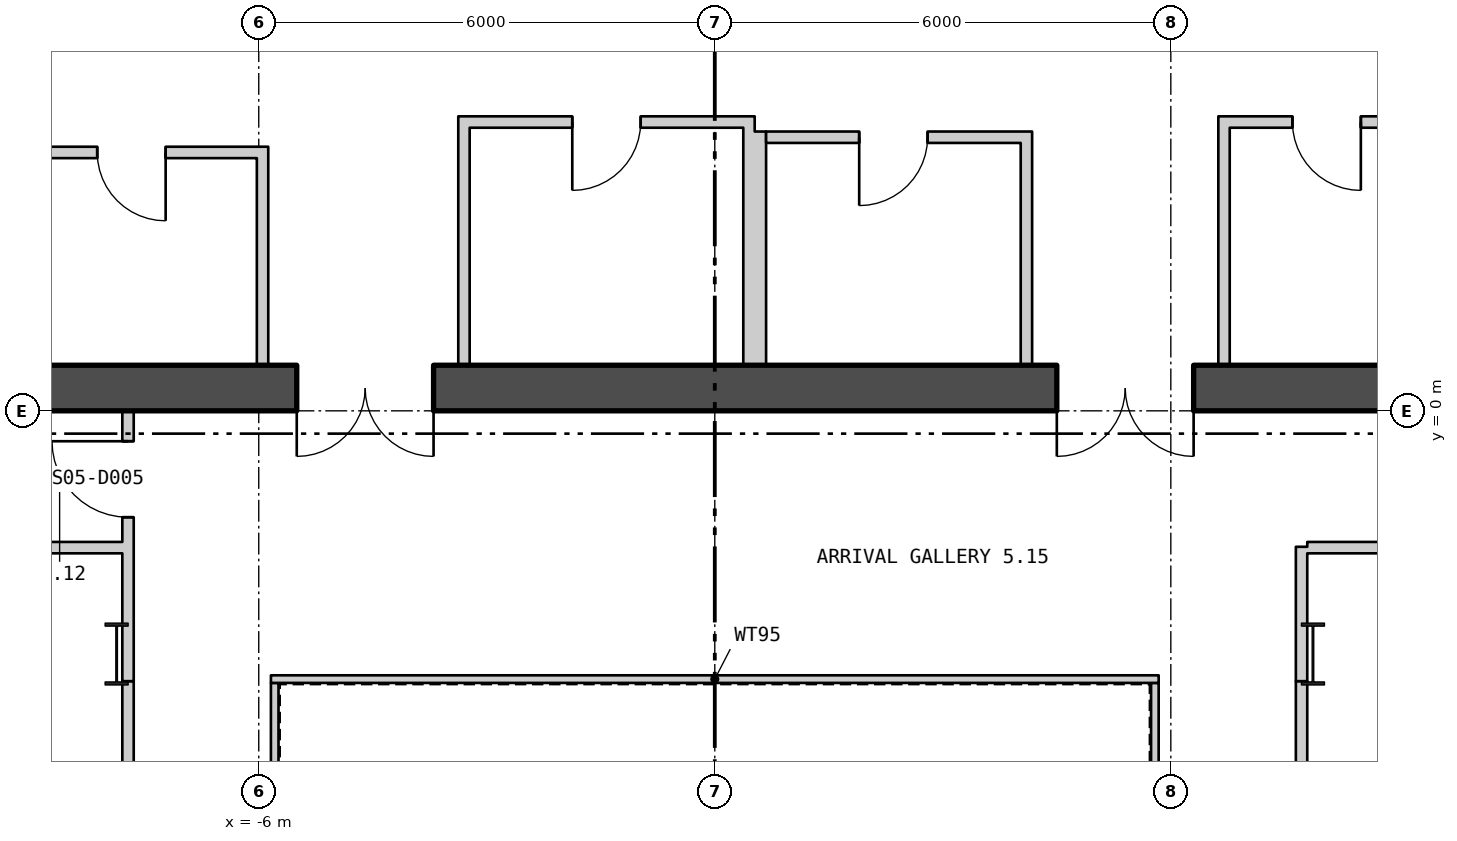
"""IFC4 building model, lengths in metres.
Left out: names, types, materials, properties, quantities, classifications, styles, units other than length and angle.
Written with IfcOpenShell. Run it as: python <this file> out.ifc"""

import sys

from ifc_helpers import new_model, si_unit, direction, frame, frame_2d, origin, origin_2d, place, context, subcontext, project, spatial, polyline, rectangle, i_section, outline, extrude, element, fill, save


model = new_model("IFC4")
c1 = context("Model", 3, precision=1e-05, world=origin(), true_north=direction((0.0, 1.0)))
c2 = subcontext(c1, "Body", "Model", "MODEL_VIEW")
j1 = project(units=[si_unit("LENGTHUNIT", "METRE"), si_unit("PLANEANGLEUNIT", "RADIAN")], contexts=[c1])
p1 = place(None, origin())
s1 = spatial("IfcSite", under=j1, at=p1, CompositionType="ELEMENT")
p2 = place(p1, origin())
s2 = spatial("IfcBuilding", under=s1, at=p2, CompositionType="ELEMENT")
p3 = place(p2, frame((0.0, 0.0, 69.3)))
s3 = spatial("IfcBuildingStorey", under=s2, at=p3, CompositionType="ELEMENT", Elevation=69.3)
for number, where, z_axis, x_axis in (
    (1, (7.87, -3.2, 0.0), (0.0, 0.0, 1.0), (1.0, 0.0, 0.0)),
    (2, (-7.87, -3.2, 0.0), (0.0, 0.0, 1.0), (1.0, 0.0, 0.0)),
):
    element("IfcColumn", number, at=place(p3, frame(where, z_axis=z_axis, x_axis=x_axis)), inside=s3, PredefinedType="COLUMN", context=c2, shape_type="SweptSolid", body=[
        extrude(i_section(OverallWidth=0.303, OverallDepth=0.814, WebThickness=0.021, FlangeThickness=0.04, at=origin_2d()), origin(), (0.0, 0.0, 1.0), 4.5),
    ])
p4 = place(p3, frame((-28.18, 10.778, -0.18), z_axis=(0.0, 0.0, 1.0), x_axis=(0.500000711659, -0.866024992908, 0.0)))
e3 = element("IfcWall", 3, at=p4, inside=s3, PredefinedType="SOLIDWALL", context=c2, shape_type="SweptSolid", body=[
    extrude(outline(polyline([(-0.13, -0.225), (45.87, -0.225), (45.61, 0.225), (0.13, 0.225), (-0.13, -0.225)])), origin(), (0.0, 0.0, 1.0), 4.28),
])
p5 = place(p4, frame((1.424, 0.0, 1.08)))
e4 = element("IfcOpeningElement", 4, at=p5, cuts=e3, PredefinedType="OPENING", context=c2, shape_type="SweptSolid", body=[
    extrude(rectangle(XDim=2.4, YDim=2.6, at=frame_2d((1.2, 1.3))), frame((0.0, 0.235, 0.0), z_axis=(0.0, -1.0, 0.0), x_axis=(1.0, 0.0, 0.0)), (0.0, 0.0, 1.0), 0.47),
])
p6 = place(p4, frame((5.893, 0.0, 1.08)))
e5 = element("IfcOpeningElement", 5, at=p6, cuts=e3, PredefinedType="OPENING", context=c2, shape_type="SweptSolid", body=[
    extrude(rectangle(XDim=2.4, YDim=2.6, at=frame_2d((1.2, 1.3))), frame((0.0, 0.235, 0.0), z_axis=(0.0, -1.0, 0.0), x_axis=(1.0, 0.0, 0.0)), (0.0, 0.0, 1.0), 0.47),
])
p7 = place(p4, frame((10.401, 0.0, 1.08)))
e6 = element("IfcOpeningElement", 6, at=p7, cuts=e3, PredefinedType="OPENING", context=c2, shape_type="SweptSolid", body=[
    extrude(rectangle(XDim=2.4, YDim=2.6, at=frame_2d((1.2, 1.3))), frame((0.0, 0.235, 0.0), z_axis=(0.0, -1.0, 0.0), x_axis=(1.0, 0.0, 0.0)), (0.0, 0.0, 1.0), 0.47),
])
p8 = place(p4, frame((14.909, 0.0, 1.08)))
e7 = element("IfcOpeningElement", 7, at=p8, cuts=e3, PredefinedType="OPENING", context=c2, shape_type="SweptSolid", body=[
    extrude(rectangle(XDim=2.4, YDim=2.6, at=frame_2d((1.2, 1.3))), frame((0.0, 0.235, 0.0), z_axis=(0.0, -1.0, 0.0), x_axis=(1.0, 0.0, 0.0)), (0.0, 0.0, 1.0), 0.47),
])
p9 = place(p4, frame((19.416, 0.0, 1.08)))
e8 = element("IfcOpeningElement", 8, at=p9, cuts=e3, PredefinedType="OPENING", context=c2, shape_type="SweptSolid", body=[
    extrude(rectangle(XDim=2.4, YDim=2.6, at=frame_2d((1.2, 1.3))), frame((0.0, 0.235, 0.0), z_axis=(0.0, -1.0, 0.0), x_axis=(1.0, 0.0, 0.0)), (0.0, 0.0, 1.0), 0.47),
])
p10 = place(p4, frame((23.924, 0.0, 1.08)))
e9 = element("IfcOpeningElement", 9, at=p10, cuts=e3, PredefinedType="OPENING", context=c2, shape_type="SweptSolid", body=[
    extrude(rectangle(XDim=2.4, YDim=2.6, at=frame_2d((1.2, 1.3))), frame((0.0, 0.235, 0.0), z_axis=(0.0, -1.0, 0.0), x_axis=(1.0, 0.0, 0.0)), (0.0, 0.0, 1.0), 0.47),
])
p11 = place(p4, frame((28.431, 0.0, 1.08)))
e10 = element("IfcOpeningElement", 10, at=p11, cuts=e3, PredefinedType="OPENING", context=c2, shape_type="SweptSolid", body=[
    extrude(rectangle(XDim=2.4, YDim=2.6, at=frame_2d((1.2, 1.3))), frame((0.0, 0.235, 0.0), z_axis=(0.0, -1.0, 0.0), x_axis=(1.0, 0.0, 0.0)), (0.0, 0.0, 1.0), 0.47),
])
p12 = place(p4, frame((32.939, 0.0, 1.08)))
e11 = element("IfcOpeningElement", 11, at=p12, cuts=e3, PredefinedType="OPENING", context=c2, shape_type="SweptSolid", body=[
    extrude(rectangle(XDim=2.4, YDim=2.6, at=frame_2d((1.2, 1.3))), frame((0.0, 0.235, 0.0), z_axis=(0.0, -1.0, 0.0), x_axis=(1.0, 0.0, 0.0)), (0.0, 0.0, 1.0), 0.47),
])
p13 = place(p4, frame((37.447, 0.0, 1.08)))
e12 = element("IfcOpeningElement", 12, at=p13, cuts=e3, PredefinedType="OPENING", context=c2, shape_type="SweptSolid", body=[
    extrude(rectangle(XDim=2.4, YDim=2.6, at=frame_2d((1.2, 1.3))), frame((0.0, 0.235, 0.0), z_axis=(0.0, -1.0, 0.0), x_axis=(1.0, 0.0, 0.0)), (0.0, 0.0, 1.0), 0.47),
])
p14 = place(p4, frame((41.916, 0.0, 1.08)))
e13 = element("IfcOpeningElement", 13, at=p14, cuts=e3, PredefinedType="OPENING", context=c2, shape_type="SweptSolid", body=[
    extrude(rectangle(XDim=2.4, YDim=2.6, at=frame_2d((1.2, 1.3))), frame((0.0, 0.235, 0.0), z_axis=(0.0, -1.0, 0.0), x_axis=(1.0, 0.0, 0.0)), (0.0, 0.0, 1.0), 0.47),
])
p15 = place(p3, frame((5.31, -28.834, -0.18), z_axis=(0.0, 0.0, 1.0), x_axis=(0.500000711659, 0.866024992908, 0.0)))
e14 = element("IfcWall", 14, at=p15, inside=s3, PredefinedType="SOLIDWALL", context=c2, shape_type="SweptSolid", body=[
    extrude(outline(polyline([(-0.13, -0.225), (45.87, -0.225), (45.61, 0.225), (0.13, 0.225), (-0.13, -0.225)])), origin(), (0.0, 0.0, 1.0), 4.28),
])
p16 = place(p15, frame((1.424, 0.0, 1.08)))
e15 = element("IfcOpeningElement", 15, at=p16, cuts=e14, PredefinedType="OPENING", context=c2, shape_type="SweptSolid", body=[
    extrude(rectangle(XDim=2.4, YDim=2.6, at=frame_2d((1.2, 1.3))), frame((0.0, 0.235, 0.0), z_axis=(0.0, -1.0, 0.0), x_axis=(1.0, 0.0, 0.0)), (0.0, 0.0, 1.0), 0.47),
])
p17 = place(p15, frame((5.893, 0.0, 1.08)))
e16 = element("IfcOpeningElement", 16, at=p17, cuts=e14, PredefinedType="OPENING", context=c2, shape_type="SweptSolid", body=[
    extrude(rectangle(XDim=2.4, YDim=2.6, at=frame_2d((1.2, 1.3))), frame((0.0, 0.235, 0.0), z_axis=(0.0, -1.0, 0.0), x_axis=(1.0, 0.0, 0.0)), (0.0, 0.0, 1.0), 0.47),
])
p18 = place(p15, frame((10.401, 0.0, 1.08)))
e17 = element("IfcOpeningElement", 17, at=p18, cuts=e14, PredefinedType="OPENING", context=c2, shape_type="SweptSolid", body=[
    extrude(rectangle(XDim=2.4, YDim=2.6, at=frame_2d((1.2, 1.3))), frame((0.0, 0.235, 0.0), z_axis=(0.0, -1.0, 0.0), x_axis=(1.0, 0.0, 0.0)), (0.0, 0.0, 1.0), 0.47),
])
p19 = place(p15, frame((14.909, 0.0, 1.08)))
e18 = element("IfcOpeningElement", 18, at=p19, cuts=e14, PredefinedType="OPENING", context=c2, shape_type="SweptSolid", body=[
    extrude(rectangle(XDim=2.4, YDim=2.6, at=frame_2d((1.2, 1.3))), frame((0.0, 0.235, 0.0), z_axis=(0.0, -1.0, 0.0), x_axis=(1.0, 0.0, 0.0)), (0.0, 0.0, 1.0), 0.47),
])
p20 = place(p15, frame((19.416, 0.0, 1.08)))
e19 = element("IfcOpeningElement", 19, at=p20, cuts=e14, PredefinedType="OPENING", context=c2, shape_type="SweptSolid", body=[
    extrude(rectangle(XDim=2.4, YDim=2.6, at=frame_2d((1.2, 1.3))), frame((0.0, 0.235, 0.0), z_axis=(0.0, -1.0, 0.0), x_axis=(1.0, 0.0, 0.0)), (0.0, 0.0, 1.0), 0.47),
])
p21 = place(p15, frame((23.924, 0.0, 1.08)))
e20 = element("IfcOpeningElement", 20, at=p21, cuts=e14, PredefinedType="OPENING", context=c2, shape_type="SweptSolid", body=[
    extrude(rectangle(XDim=2.4, YDim=2.6, at=frame_2d((1.2, 1.3))), frame((0.0, 0.235, 0.0), z_axis=(0.0, -1.0, 0.0), x_axis=(1.0, 0.0, 0.0)), (0.0, 0.0, 1.0), 0.47),
])
p22 = place(p15, frame((28.431, 0.0, 1.08)))
e21 = element("IfcOpeningElement", 21, at=p22, cuts=e14, PredefinedType="OPENING", context=c2, shape_type="SweptSolid", body=[
    extrude(rectangle(XDim=2.4, YDim=2.6, at=frame_2d((1.2, 1.3))), frame((0.0, 0.235, 0.0), z_axis=(0.0, -1.0, 0.0), x_axis=(1.0, 0.0, 0.0)), (0.0, 0.0, 1.0), 0.47),
])
p23 = place(p15, frame((37.447, 0.0, 1.08)))
e22 = element("IfcOpeningElement", 22, at=p23, cuts=e14, PredefinedType="OPENING", context=c2, shape_type="SweptSolid", body=[
    extrude(rectangle(XDim=2.4, YDim=2.6, at=frame_2d((1.2, 1.3))), frame((0.0, 0.235, 0.0), z_axis=(0.0, -1.0, 0.0), x_axis=(1.0, 0.0, 0.0)), (0.0, 0.0, 1.0), 0.47),
])
p24 = place(p15, frame((41.916, 0.0, 1.08)))
e23 = element("IfcOpeningElement", 23, at=p24, cuts=e14, PredefinedType="OPENING", context=c2, shape_type="SweptSolid", body=[
    extrude(rectangle(XDim=2.4, YDim=2.6, at=frame_2d((1.2, 1.3))), frame((0.0, 0.235, 0.0), z_axis=(0.0, -1.0, 0.0), x_axis=(1.0, 0.0, 0.0)), (0.0, 0.0, 1.0), 0.47),
])
p25 = place(p3, frame((5.79, -11.62, 0.0), z_axis=(0.0, 0.0, 1.0), x_axis=(0.0, 1.0, 0.0)))
e24 = element("IfcWall", 24, at=p25, inside=s3, PredefinedType="PARTITIONING", context=c2, shape_type="SweptSolid", body=[
    extrude(rectangle(XDim=8.04, YDim=0.1, at=frame_2d((4.02, 0.0))), origin(), (0.0, 0.0, 1.0), 4.3),
])
p26 = place(p3, frame((5.84, -3.53, 0.0), z_axis=(0.0, 0.0, 1.0), x_axis=(-1.0, 0.0, 0.0)))
e25 = element("IfcWall", 25, at=p26, inside=s3, PredefinedType="PARTITIONING", context=c2, shape_type="SweptSolid", body=[
    extrude(rectangle(XDim=11.68, YDim=0.1, at=frame_2d((5.84, 0.0))), origin(), (0.0, 0.0, 1.0), 4.3),
])
p27 = place(p3, frame((-5.79, -3.58, 0.0), z_axis=(0.0, 0.0, 1.0), x_axis=(0.0, -1.0, 0.0)))
e26 = element("IfcWall", 26, at=p27, inside=s3, PredefinedType="PARTITIONING", context=c2, shape_type="SweptSolid", body=[
    extrude(rectangle(XDim=8.04, YDim=0.1, at=frame_2d((4.02, 0.0))), origin(), (0.0, 0.0, 1.0), 4.3),
])
p28 = place(p3, frame((-17.5, 0.3, 0.0), z_axis=(0.0, 0.0, 1.0), x_axis=(1.0, 0.0, 0.0)))
e27 = element("IfcWall", 27, at=p28, inside=s3, PredefinedType="SHEAR", context=c2, shape_type="SweptSolid", body=[
    extrude(rectangle(XDim=35.0, YDim=0.6, at=frame_2d((17.5, 0.0))), origin(), (0.0, 0.0, 1.0), 4.3),
])
p29 = place(p28, frame((12.0, 0.0, 0.0)))
e28 = element("IfcOpeningElement", 28, at=p29, cuts=e27, PredefinedType="OPENING", context=c2, shape_type="SweptSolid", body=[
    extrude(rectangle(XDim=1.8, YDim=2.4, at=frame_2d((0.9, 1.2))), frame((0.0, 0.31, 0.0), z_axis=(0.0, -1.0, 0.0), x_axis=(1.0, 0.0, 0.0)), (0.0, 0.0, 1.0), 0.62),
])
p30 = place(p28, frame((22.0, 0.0, 0.0)))
e29 = element("IfcOpeningElement", 29, at=p30, cuts=e27, PredefinedType="OPENING", context=c2, shape_type="SweptSolid", body=[
    extrude(rectangle(XDim=1.8, YDim=2.4, at=frame_2d((0.9, 1.2))), frame((0.0, 0.31, 0.0), z_axis=(0.0, -1.0, 0.0), x_axis=(1.0, 0.0, 0.0)), (0.0, 0.0, 1.0), 0.62),
])
p31 = place(p3, frame((-5.95, 0.6, 0.0), z_axis=(0.0, 0.0, 1.0), x_axis=(0.0, 1.0, 0.0)))
e30 = element("IfcWall", 30, at=p31, inside=s3, PredefinedType="PARTITIONING", context=c2, shape_type="SweptSolid", body=[
    extrude(rectangle(XDim=2.875, YDim=0.15, at=frame_2d((1.438, 0.0))), origin(), (0.0, 0.0, 1.0), 4.3),
])
p32 = place(p3, frame((-9.325, 3.4, 0.0), z_axis=(0.0, 0.0, 1.0), x_axis=(1.0, 0.0, 0.0)))
e31 = element("IfcWall", 31, at=p32, inside=s3, PredefinedType="PARTITIONING", context=c2, shape_type="SweptSolid", body=[
    extrude(rectangle(XDim=3.3, YDim=0.15, at=frame_2d((1.65, 0.0))), origin(), (0.0, 0.0, 1.0), 4.3),
])
p33 = place(p32, frame((1.2, 0.0, 0.0)))
e32 = element("IfcOpeningElement", 32, at=p33, cuts=e31, PredefinedType="OPENING", context=c2, shape_type="SweptSolid", body=[
    extrude(rectangle(XDim=0.9, YDim=2.1, at=frame_2d((0.45, 1.05))), frame((0.0, 0.085, 0.0), z_axis=(0.0, -1.0, 0.0), x_axis=(1.0, 0.0, 0.0)), (0.0, 0.0, 1.0), 0.17),
])
for number, where, z_axis, x_axis in (
    (33, (-3.3, 0.6, 0.0), (0.0, 0.0, 1.0), (0.0, 1.0, 0.0)),
    (34, (0.45, 0.6, 0.0), (0.0, 0.0, 1.0), (0.0, 1.0, 0.0)),
):
    element("IfcWall", number, at=place(p3, frame(where, z_axis=z_axis, x_axis=x_axis)), inside=s3, PredefinedType="PARTITIONING", context=c2, shape_type="SweptSolid", body=[
        extrude(rectangle(XDim=3.275, YDim=0.15, at=frame_2d((1.637, 0.0))), origin(), (0.0, 0.0, 1.0), 4.3),
    ])
p34 = place(p3, frame((-3.225, 3.8, 0.0), z_axis=(0.0, 0.0, 1.0), x_axis=(1.0, 0.0, 0.0)))
e35 = element("IfcWall", 35, at=p34, inside=s3, PredefinedType="PARTITIONING", context=c2, shape_type="SweptSolid", body=[
    extrude(rectangle(XDim=3.6, YDim=0.15, at=frame_2d((1.8, 0.0))), origin(), (0.0, 0.0, 1.0), 4.3),
])
p35 = place(p34, frame((1.35, 0.0, 0.0)))
e36 = element("IfcOpeningElement", 36, at=p35, cuts=e35, PredefinedType="OPENING", context=c2, shape_type="SweptSolid", body=[
    extrude(rectangle(XDim=0.9, YDim=2.1, at=frame_2d((0.45, 1.05))), frame((0.0, 0.085, 0.0), z_axis=(0.0, -1.0, 0.0), x_axis=(1.0, 0.0, 0.0)), (0.0, 0.0, 1.0), 0.17),
])
for number, where, z_axis, x_axis in (
    (37, (0.6, 0.6, 0.0), (0.0, 0.0, 1.0), (0.0, 1.0, 0.0)),
    (38, (4.1, 0.6, 0.0), (0.0, 0.0, 1.0), (0.0, 1.0, 0.0)),
):
    element("IfcWall", number, at=place(p3, frame(where, z_axis=z_axis, x_axis=x_axis)), inside=s3, PredefinedType="PARTITIONING", context=c2, shape_type="SweptSolid", body=[
        extrude(rectangle(XDim=3.075, YDim=0.15, at=frame_2d((1.538, 0.0))), origin(), (0.0, 0.0, 1.0), 4.3),
    ])
p36 = place(p3, frame((0.675, 3.6, 0.0), z_axis=(0.0, 0.0, 1.0), x_axis=(1.0, 0.0, 0.0)))
e39 = element("IfcWall", 39, at=p36, inside=s3, PredefinedType="PARTITIONING", context=c2, shape_type="SweptSolid", body=[
    extrude(rectangle(XDim=3.35, YDim=0.15, at=frame_2d((1.675, 0.0))), origin(), (0.0, 0.0, 1.0), 4.3),
])
p37 = place(p36, frame((1.225, 0.0, 0.0)))
e40 = element("IfcOpeningElement", 40, at=p37, cuts=e39, PredefinedType="OPENING", context=c2, shape_type="SweptSolid", body=[
    extrude(rectangle(XDim=0.9, YDim=2.1, at=frame_2d((0.45, 1.05))), frame((0.0, 0.085, 0.0), z_axis=(0.0, -1.0, 0.0), x_axis=(1.0, 0.0, 0.0)), (0.0, 0.0, 1.0), 0.17),
])
p38 = place(p3, frame((6.7, 0.6, 0.0), z_axis=(0.0, 0.0, 1.0), x_axis=(0.0, 1.0, 0.0)))
e41 = element("IfcWall", 41, at=p38, inside=s3, PredefinedType="PARTITIONING", context=c2, shape_type="SweptSolid", body=[
    extrude(rectangle(XDim=3.275, YDim=0.15, at=frame_2d((1.637, 0.0))), origin(), (0.0, 0.0, 1.0), 4.3),
])
p39 = place(p3, frame((6.775, 3.8, 0.0), z_axis=(0.0, 0.0, 1.0), x_axis=(1.0, 0.0, 0.0)))
e42 = element("IfcWall", 42, at=p39, inside=s3, PredefinedType="PARTITIONING", context=c2, shape_type="SweptSolid", body=[
    extrude(rectangle(XDim=2.55, YDim=0.15, at=frame_2d((1.275, 0.0))), origin(), (0.0, 0.0, 1.0), 4.3),
])
p40 = place(p39, frame((0.825, 0.0, 0.0)))
e43 = element("IfcOpeningElement", 43, at=p40, cuts=e42, PredefinedType="OPENING", context=c2, shape_type="SweptSolid", body=[
    extrude(rectangle(XDim=0.9, YDim=2.1, at=frame_2d((0.45, 1.05))), frame((0.0, 0.085, 0.0), z_axis=(0.0, -1.0, 0.0), x_axis=(1.0, 0.0, 0.0)), (0.0, 0.0, 1.0), 0.17),
])
p41 = place(p3, frame((-19.225, -1.8, 0.0), z_axis=(0.0, 0.0, 1.0), x_axis=(1.0, 0.0, 0.0)))
e44 = element("IfcWall", 44, at=p41, inside=s3, PredefinedType="PARTITIONING", context=c2, shape_type="SweptSolid", body=[
    extrude(rectangle(XDim=11.43, YDim=0.15, at=frame_2d((5.715, 0.0))), origin(), (0.0, 0.0, 1.0), 4.3),
])
p42 = place(p3, frame((-7.72, -13.675, 0.0), z_axis=(0.0, 0.0, 1.0), x_axis=(0.0, 1.0, 0.0)))
e45 = element("IfcWall", 45, at=p42, inside=s3, PredefinedType="PARTITIONING", context=c2, shape_type="SweptSolid", body=[
    extrude(rectangle(XDim=10.118, YDim=0.15, at=frame_2d((5.059, 0.0))), origin(), (0.0, 0.0, 1.0), 3.61),
])
p43 = place(p3, frame((-7.72, -3.557, 0.0), z_axis=(0.0, 0.0, 1.0), x_axis=(0.0, 1.0, 0.0)))
e46 = element("IfcWall", 46, at=p43, inside=s3, PredefinedType="PARTITIONING", context=c2, shape_type="SweptSolid", body=[
    extrude(rectangle(XDim=3.557, YDim=0.15, at=frame_2d((1.778, 0.0))), origin(), (0.0, 0.0, 1.0), 4.3),
])
p44 = place(p43, frame((2.157, 0.0, 0.0)))
e47 = element("IfcOpeningElement", 47, at=p44, cuts=e46, PredefinedType="OPENING", context=c2, shape_type="SweptSolid", body=[
    extrude(rectangle(XDim=1.0, YDim=2.1, at=frame_2d((0.5, 1.05))), frame((0.0, 0.085, 0.0), z_axis=(0.0, -1.0, 0.0), x_axis=(1.0, 0.0, 0.0)), (0.0, 0.0, 1.0), 0.17),
])
p45 = place(p3, frame((7.72, -13.675, 0.0), z_axis=(0.0, 0.0, 1.0), x_axis=(0.0, 1.0, 0.0)))
e48 = element("IfcWall", 48, at=p45, inside=s3, PredefinedType="PARTITIONING", context=c2, shape_type="SweptSolid", body=[
    extrude(rectangle(XDim=10.118, YDim=0.15, at=frame_2d((5.059, 0.0))), origin(), (0.0, 0.0, 1.0), 3.61),
])
p46 = place(p3, frame((7.72, -3.557, 0.0), z_axis=(0.0, 0.0, 1.0), x_axis=(0.0, 1.0, 0.0)))
e49 = element("IfcWall", 49, at=p46, inside=s3, PredefinedType="PARTITIONING", context=c2, shape_type="SweptSolid", body=[
    extrude(rectangle(XDim=1.768, YDim=0.15, at=frame_2d((0.884, 0.0))), origin(), (0.0, 0.0, 1.0), 4.3),
])
p47 = place(p3, frame((7.795, -1.8, 0.0), z_axis=(0.0, 0.0, 1.0), x_axis=(1.0, 0.0, 0.0)))
e50 = element("IfcWall", 50, at=p47, inside=s3, PredefinedType="PARTITIONING", context=c2, shape_type="SweptSolid", body=[
    extrude(rectangle(XDim=11.43, YDim=0.15, at=frame_2d((5.715, 0.0))), origin(), (0.0, 0.0, 1.0), 4.3),
])
p48 = place(p47, frame((2.121, 0.0, 0.0)))
e51 = element("IfcOpeningElement", 51, at=p48, cuts=e50, PredefinedType="OPENING", context=c2, shape_type="SweptSolid", body=[
    extrude(rectangle(XDim=1.0, YDim=2.1, at=frame_2d((0.5, 1.05))), frame((0.0, 0.085, 0.0), z_axis=(0.0, -1.0, 0.0), x_axis=(1.0, 0.0, 0.0)), (0.0, 0.0, 1.0), 0.17),
])
p49 = place(p33, origin())
e52 = element("IfcDoor", 52, at=p49, inside=s3, OperationType="SINGLE_SWING_RIGHT", PredefinedType="DOOR", context=c2, shape_type="SweptSolid", body=[
    extrude(rectangle(XDim=0.9, YDim=2.1, at=frame_2d((0.45, 1.05))), frame((0.0, 0.025, 0.0), z_axis=(0.0, -1.0, 0.0), x_axis=(1.0, 0.0, 0.0)), (0.0, 0.0, 1.0), 0.05),
])
fill(e32, e52)
p50 = place(p35, origin())
e53 = element("IfcDoor", 53, at=p50, inside=s3, OperationType="SINGLE_SWING_LEFT", PredefinedType="DOOR", context=c2, shape_type="SweptSolid", body=[
    extrude(rectangle(XDim=0.9, YDim=2.1, at=frame_2d((0.45, 1.05))), frame((0.0, 0.025, 0.0), z_axis=(0.0, -1.0, 0.0), x_axis=(1.0, 0.0, 0.0)), (0.0, 0.0, 1.0), 0.05),
])
fill(e36, e53)
p51 = place(p37, origin())
e54 = element("IfcDoor", 54, at=p51, inside=s3, OperationType="SINGLE_SWING_LEFT", PredefinedType="DOOR", context=c2, shape_type="SweptSolid", body=[
    extrude(rectangle(XDim=0.9, YDim=2.1, at=frame_2d((0.45, 1.05))), frame((0.0, 0.025, 0.0), z_axis=(0.0, -1.0, 0.0), x_axis=(1.0, 0.0, 0.0)), (0.0, 0.0, 1.0), 0.05),
])
fill(e40, e54)
p52 = place(p40, origin())
e55 = element("IfcDoor", 55, at=p52, inside=s3, OperationType="SINGLE_SWING_RIGHT", PredefinedType="DOOR", context=c2, shape_type="SweptSolid", body=[
    extrude(rectangle(XDim=0.9, YDim=2.1, at=frame_2d((0.45, 1.05))), frame((0.0, 0.025, 0.0), z_axis=(0.0, -1.0, 0.0), x_axis=(1.0, 0.0, 0.0)), (0.0, 0.0, 1.0), 0.05),
])
fill(e43, e55)
p53 = place(p29, origin())
e56 = element("IfcDoor", 56, at=p53, inside=s3, OperationType="DOUBLE_DOOR_SINGLE_SWING", PredefinedType="DOOR", context=c2, shape_type="SweptSolid", body=[
    extrude(rectangle(XDim=1.8, YDim=2.4, at=frame_2d((0.9, 1.2))), frame((0.0, 0.025, 0.0), z_axis=(0.0, -1.0, 0.0), x_axis=(1.0, 0.0, 0.0)), (0.0, 0.0, 1.0), 0.05),
])
fill(e28, e56)
p54 = place(p30, origin())
e57 = element("IfcDoor", 57, at=p54, inside=s3, OperationType="DOUBLE_DOOR_SINGLE_SWING", PredefinedType="DOOR", context=c2, shape_type="SweptSolid", body=[
    extrude(rectangle(XDim=1.8, YDim=2.4, at=frame_2d((0.9, 1.2))), frame((0.0, 0.025, 0.0), z_axis=(0.0, -1.0, 0.0), x_axis=(1.0, 0.0, 0.0)), (0.0, 0.0, 1.0), 0.05),
])
fill(e29, e57)
p55 = place(p44, origin())
e58 = element("IfcDoor", 58, at=p55, inside=s3, OperationType="SINGLE_SWING_LEFT", PredefinedType="DOOR", context=c2, shape_type="SweptSolid", body=[
    extrude(rectangle(XDim=1.0, YDim=2.1, at=frame_2d((0.5, 1.05))), frame((0.0, 0.025, 0.0), z_axis=(0.0, -1.0, 0.0), x_axis=(1.0, 0.0, 0.0)), (0.0, 0.0, 1.0), 0.05),
])
fill(e47, e58)
save(model, sys.argv[1])
